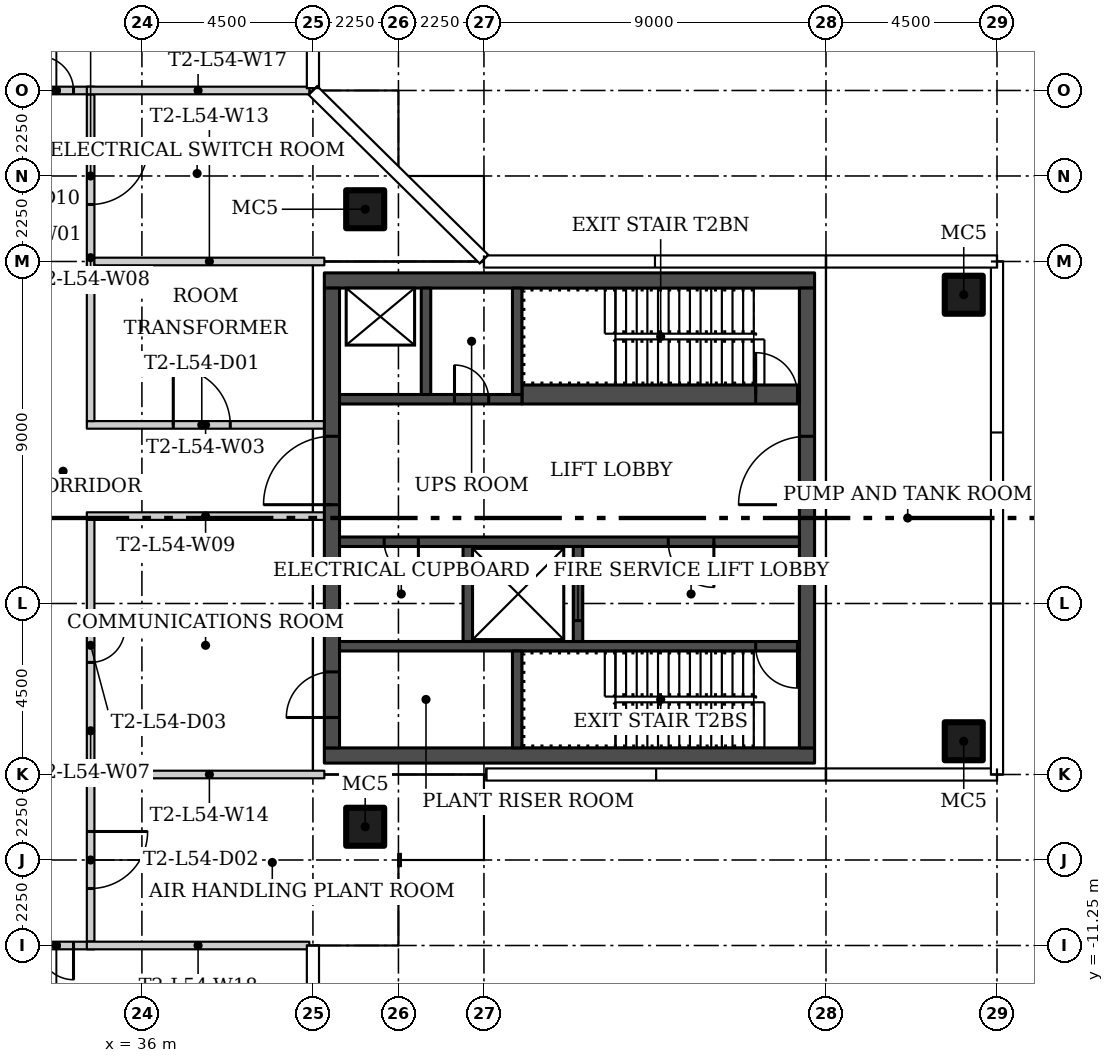
"""IFC4 building model, lengths in metres.
Left out: names, types, materials, properties, quantities, classifications, styles, units other than length and angle.
Written with IfcOpenShell. Run it as: python <this file> out.ifc"""

import sys

from ifc_helpers import new_model, si_unit, direction, frame, frame_2d, origin, origin_2d, place, context, subcontext, project, spatial, rectangle, hollow_rectangle, extrude, element, fill, save


model = new_model("IFC4")
c1 = context("Model", 3, precision=1e-05, world=origin(), true_north=direction((0.0, 1.0)))
c2 = subcontext(c1, "Body", "Model", "MODEL_VIEW")
j1 = project(units=[si_unit("LENGTHUNIT", "METRE"), si_unit("PLANEANGLEUNIT", "RADIAN")], contexts=[c1])
p1 = place(None, origin())
s1 = spatial("IfcSite", under=j1, at=p1, CompositionType="ELEMENT")
p2 = place(p1, origin())
s2 = spatial("IfcBuilding", under=s1, at=p2, CompositionType="ELEMENT")
p3 = place(p2, frame((0.0, 0.0, 225.6)))
s3 = spatial("IfcBuildingStorey", under=s2, at=p3, CompositionType="ELEMENT", Elevation=225.6)
for number, where in (
    (1, (41.875, 8.125, 0.0)),
    (2, (41.875, -8.125, 0.0)),
    (3, (57.625, -5.875, 0.0)),
    (4, (57.625, 5.875, 0.0)),
):
    element("IfcColumn", number, at=place(p3, frame(where)), inside=s3, PredefinedType="COLUMN", context=c2, shape_type="SweptSolid", body=[
        extrude(hollow_rectangle(XDim=1.0, YDim=1.0, WallThickness=0.04, at=origin_2d()), origin(), (0.0, 0.0, 1.0), 4.45),
    ])
p4 = place(p3, frame((34.55, 2.45, 0.0)))
e5 = element("IfcWall", 5, at=p4, inside=s3, PredefinedType="PARTITIONING", context=c2, shape_type="SweptSolid", body=[
    extrude(rectangle(XDim=6.25, YDim=0.2, at=frame_2d((3.125, 0.0))), origin(), (0.0, 0.0, 1.0), 4.45),
])
p5 = place(p4, frame((2.275, 0.0, 0.0)))
e6 = element("IfcOpeningElement", 6, at=p5, cuts=e5, PredefinedType="OPENING", context=c2, shape_type="SweptSolid", body=[
    extrude(rectangle(XDim=1.5, YDim=2.4, at=frame_2d((0.75, 1.2))), frame((0.0, 0.11, 0.0), z_axis=(0.0, -1.0, 0.0), x_axis=(1.0, 0.0, 0.0)), (0.0, 0.0, 1.0), 0.22),
])
p6 = place(p3, frame((34.65, -0.05, 0.0), z_axis=(0.0, 0.0, 1.0), x_axis=(0.0, -1.0, 0.0)))
e7 = element("IfcWall", 7, at=p6, inside=s3, PredefinedType="PARTITIONING", context=c2, shape_type="SweptSolid", body=[
    extrude(rectangle(XDim=11.1, YDim=0.2, at=frame_2d((5.55, 0.0))), origin(), (0.0, 0.0, 1.0), 4.45),
])
p7 = place(p6, frame((8.2, 0.0, 0.0)))
e8 = element("IfcOpeningElement", 8, at=p7, cuts=e7, PredefinedType="OPENING", context=c2, shape_type="SweptSolid", body=[
    extrude(rectangle(XDim=1.5, YDim=2.4, at=frame_2d((0.75, 1.2))), frame((0.0, 0.11, 0.0), z_axis=(0.0, -1.0, 0.0), x_axis=(1.0, 0.0, 0.0)), (0.0, 0.0, 1.0), 0.22),
])
p8 = place(p6, frame((2.85, 0.0, 0.0)))
e9 = element("IfcOpeningElement", 9, at=p8, cuts=e7, PredefinedType="OPENING", context=c2, shape_type="SweptSolid", body=[
    extrude(rectangle(XDim=0.9, YDim=2.1, at=frame_2d((0.45, 1.05))), frame((0.0, 0.11, 0.0), z_axis=(0.0, -1.0, 0.0), x_axis=(1.0, 0.0, 0.0)), (0.0, 0.0, 1.0), 0.22),
])
p9 = place(p3, frame((34.65, 11.15, 0.0), z_axis=(0.0, 0.0, 1.0), x_axis=(0.0, -1.0, 0.0)))
e10 = element("IfcWall", 10, at=p9, inside=s3, PredefinedType="PARTITIONING", context=c2, shape_type="SweptSolid", body=[
    extrude(rectangle(XDim=8.6, YDim=0.2, at=frame_2d((4.3, 0.0))), origin(), (0.0, 0.0, 1.0), 4.45),
])
p10 = place(p9, frame((1.4, 0.0, 0.0)))
e11 = element("IfcOpeningElement", 11, at=p10, cuts=e10, PredefinedType="OPENING", context=c2, shape_type="SweptSolid", body=[
    extrude(rectangle(XDim=1.5, YDim=2.4, at=frame_2d((0.75, 1.2))), frame((0.0, 0.11, 0.0), z_axis=(0.0, -1.0, 0.0), x_axis=(1.0, 0.0, 0.0)), (0.0, 0.0, 1.0), 0.22),
])
p11 = place(p3, frame((40.8, 0.05, 0.0), z_axis=(0.0, 0.0, 1.0), x_axis=(-1.0, 0.0, 0.0)))
e12 = element("IfcWall", 12, at=p11, inside=s3, PredefinedType="PARTITIONING", context=c2, shape_type="SweptSolid", body=[
    extrude(rectangle(XDim=6.25, YDim=0.2, at=frame_2d((3.125, 0.0))), origin(), (0.0, 0.0, 1.0), 4.45),
])
p12 = place(p3, frame((32.75, 11.25, 0.0)))
e13 = element("IfcWall", 13, at=p12, inside=s3, PredefinedType="PARTITIONING", context=c2, shape_type="SweptSolid", body=[
    extrude(rectangle(XDim=2.001, YDim=0.2, at=frame_2d((1.0, 0.0))), origin(), (0.0, 0.0, 1.0), 4.45),
])
p13 = place(p12, frame((0.55, 0.0, 0.0)))
e14 = element("IfcOpeningElement", 14, at=p13, cuts=e13, PredefinedType="OPENING", context=c2, shape_type="SweptSolid", body=[
    extrude(rectangle(XDim=0.9, YDim=2.4, at=frame_2d((0.45, 1.2))), frame((0.0, 0.11, 0.0), z_axis=(0.0, -1.0, 0.0), x_axis=(1.0, 0.0, 0.0)), (0.0, 0.0, 1.0), 0.22),
])
p14 = place(p3, frame((34.75, -11.25, 0.0), z_axis=(0.0, 0.0, 1.0), x_axis=(-1.0, 0.0, 0.0)))
e15 = element("IfcWall", 15, at=p14, inside=s3, PredefinedType="PARTITIONING", context=c2, shape_type="SweptSolid", body=[
    extrude(rectangle(XDim=2.001, YDim=0.2, at=frame_2d((1.0, 0.0))), origin(), (0.0, 0.0, 1.0), 4.45),
])
p15 = place(p14, frame((0.55, 0.0, 0.0)))
e16 = element("IfcOpeningElement", 16, at=p15, cuts=e15, PredefinedType="OPENING", context=c2, shape_type="SweptSolid", body=[
    extrude(rectangle(XDim=0.9, YDim=2.4, at=frame_2d((0.45, 1.2))), frame((0.0, 0.11, 0.0), z_axis=(0.0, -1.0, 0.0), x_axis=(1.0, 0.0, 0.0)), (0.0, 0.0, 1.0), 0.22),
])
p16 = place(p3, frame((40.8, 6.75, 0.0), z_axis=(0.0, 0.0, 1.0), x_axis=(-1.0, 0.0, 0.0)))
e17 = element("IfcWall", 17, at=p16, inside=s3, PredefinedType="PARTITIONING", context=c2, shape_type="SweptSolid", body=[
    extrude(rectangle(XDim=6.05, YDim=0.2, at=frame_2d((3.025, 0.0))), origin(), (0.0, 0.0, 1.0), 4.45),
])
p17 = place(p3, frame((34.75, -6.75, 0.0)))
e18 = element("IfcWall", 18, at=p17, inside=s3, PredefinedType="PARTITIONING", context=c2, shape_type="SweptSolid", body=[
    extrude(rectangle(XDim=6.05, YDim=0.2, at=frame_2d((3.025, 0.0))), origin(), (0.0, 0.0, 1.0), 4.45),
])
p18 = place(p3, frame((40.405, 11.25, 0.0), z_axis=(0.0, 0.0, 1.0), x_axis=(-1.0, 0.0, 0.0)))
e19 = element("IfcWall", 19, at=p18, inside=s3, PredefinedType="PARTITIONING", context=c2, shape_type="SweptSolid", body=[
    extrude(rectangle(XDim=5.855, YDim=0.2, at=frame_2d((2.927, 0.0))), origin(), (0.0, 0.0, 1.0), 4.45),
])
p19 = place(p3, frame((34.55, -11.25, 0.0)))
e20 = element("IfcWall", 20, at=p19, inside=s3, PredefinedType="PARTITIONING", context=c2, shape_type="SweptSolid", body=[
    extrude(rectangle(XDim=5.855, YDim=0.2, at=frame_2d((2.927, 0.0))), origin(), (0.0, 0.0, 1.0), 4.45),
])
for number, where, z_axis, x_axis in (
    (21, (53.7, -6.25, 0.0), (0.0, 0.0, 1.0), (-1.0, 0.0, 0.0)),
    (22, (53.7, 6.25, 0.0), (0.0, 0.0, 1.0), (-1.0, 0.0, 0.0)),
):
    element("IfcWall", number, at=place(p3, frame(where, z_axis=z_axis, x_axis=x_axis)), inside=s3, PredefinedType="SHEAR", context=c2, shape_type="SweptSolid", body=[
        extrude(rectangle(XDim=12.9, YDim=0.4, at=frame_2d((6.45, 0.0))), origin(), (0.0, 0.0, 1.0), 4.45),
    ])
p20 = place(p3, frame((53.5, -6.05, 0.0), z_axis=(0.0, 0.0, 1.0), x_axis=(0.0, 1.0, 0.0)))
e23 = element("IfcWall", 23, at=p20, inside=s3, PredefinedType="SHEAR", context=c2, shape_type="SweptSolid", body=[
    extrude(rectangle(XDim=12.1, YDim=0.4, at=frame_2d((6.05, 0.0))), origin(), (0.0, 0.0, 1.0), 4.45),
])
p21 = place(p20, frame((6.4, 0.0, 0.0)))
e24 = element("IfcOpeningElement", 24, at=p21, cuts=e23, PredefinedType="OPENING", context=c2, shape_type="SweptSolid", body=[
    extrude(rectangle(XDim=1.8, YDim=2.4, at=frame_2d((0.9, 1.2))), frame((0.0, 0.21, 0.0), z_axis=(0.0, -1.0, 0.0), x_axis=(1.0, 0.0, 0.0)), (0.0, 0.0, 1.0), 0.42),
])
p22 = place(p3, frame((41.0, -6.05, 0.0), z_axis=(0.0, 0.0, 1.0), x_axis=(0.0, 1.0, 0.0)))
e25 = element("IfcWall", 25, at=p22, inside=s3, PredefinedType="SHEAR", context=c2, shape_type="SweptSolid", body=[
    extrude(rectangle(XDim=12.1, YDim=0.4, at=frame_2d((6.05, 0.0))), origin(), (0.0, 0.0, 1.0), 4.45),
])
p23 = place(p22, frame((0.8, 0.0, 0.0)))
e26 = element("IfcOpeningElement", 26, at=p23, cuts=e25, PredefinedType="OPENING", context=c2, shape_type="SweptSolid", body=[
    extrude(rectangle(XDim=1.2, YDim=2.1, at=frame_2d((0.6, 1.05))), frame((0.0, 0.21, 0.0), z_axis=(0.0, -1.0, 0.0), x_axis=(1.0, 0.0, 0.0)), (0.0, 0.0, 1.0), 0.42),
])
p24 = place(p22, frame((6.4, 0.0, 0.0)))
e27 = element("IfcOpeningElement", 27, at=p24, cuts=e25, PredefinedType="OPENING", context=c2, shape_type="SweptSolid", body=[
    extrude(rectangle(XDim=1.8, YDim=2.4, at=frame_2d((0.9, 1.2))), frame((0.0, 0.21, 0.0), z_axis=(0.0, -1.0, 0.0), x_axis=(1.0, 0.0, 0.0)), (0.0, 0.0, 1.0), 0.42),
])
p25 = place(p3, frame((53.3, -3.375, 0.0), z_axis=(0.0, 0.0, 1.0), x_axis=(-1.0, 0.0, 0.0)))
e28 = element("IfcWall", 28, at=p25, inside=s3, PredefinedType="SHEAR", context=c2, shape_type="SweptSolid", body=[
    extrude(rectangle(XDim=12.1, YDim=0.25, at=frame_2d((6.05, 0.0))), origin(), (0.0, 0.0, 1.0), 4.45),
])
p26 = place(p25, frame((0.05, 0.0, 0.0)))
e29 = element("IfcOpeningElement", 29, at=p26, cuts=e28, PredefinedType="OPENING", context=c2, shape_type="SweptSolid", body=[
    extrude(rectangle(XDim=1.1, YDim=2.1, at=frame_2d((0.55, 1.05))), frame((0.0, 0.135, 0.0), z_axis=(0.0, -1.0, 0.0), x_axis=(1.0, 0.0, 0.0)), (0.0, 0.0, 1.0), 0.27),
])
p27 = place(p3, frame((45.875, -6.05, 0.0), z_axis=(0.0, 0.0, 1.0), x_axis=(0.0, 1.0, 0.0)))
e30 = element("IfcWall", 30, at=p27, inside=s3, PredefinedType="SHEAR", context=c2, shape_type="SweptSolid", body=[
    extrude(rectangle(XDim=2.55, YDim=0.25, at=frame_2d((1.275, 0.0))), origin(), (0.0, 0.0, 1.0), 4.45),
])
p28 = place(p3, frame((53.3, -0.625, 0.0), z_axis=(0.0, 0.0, 1.0), x_axis=(-1.0, 0.0, 0.0)))
e31 = element("IfcWall", 31, at=p28, inside=s3, PredefinedType="SHEAR", context=c2, shape_type="SweptSolid", body=[
    extrude(rectangle(XDim=12.1, YDim=0.25, at=frame_2d((6.05, 0.0))), origin(), (0.0, 0.0, 1.0), 4.45),
])
p29 = place(p28, frame((2.25, 0.0, 0.0)))
e32 = element("IfcOpeningElement", 32, at=p29, cuts=e31, PredefinedType="OPENING", context=c2, shape_type="SweptSolid", body=[
    extrude(rectangle(XDim=1.2, YDim=2.1, at=frame_2d((0.6, 1.05))), frame((0.0, 0.135, 0.0), z_axis=(0.0, -1.0, 0.0), x_axis=(1.0, 0.0, 0.0)), (0.0, 0.0, 1.0), 0.27),
])
p30 = place(p28, frame((10.025, 0.0, 0.0)))
e33 = element("IfcOpeningElement", 33, at=p30, cuts=e31, PredefinedType="OPENING", context=c2, shape_type="SweptSolid", body=[
    extrude(rectangle(XDim=0.9, YDim=2.1, at=frame_2d((0.45, 1.05))), frame((0.0, 0.135, 0.0), z_axis=(0.0, -1.0, 0.0), x_axis=(1.0, 0.0, 0.0)), (0.0, 0.0, 1.0), 0.27),
])
p31 = place(p3, frame((47.475, -3.25, 0.0), z_axis=(0.0, 0.0, 1.0), x_axis=(0.0, 1.0, 0.0)))
e34 = element("IfcWall", 34, at=p31, inside=s3, PredefinedType="SHEAR", context=c2, shape_type="SweptSolid", body=[
    extrude(rectangle(XDim=2.5, YDim=0.25, at=frame_2d((1.25, 0.0))), origin(), (0.0, 0.0, 1.0), 4.45),
])
p32 = place(p31, frame((0.55, 0.0, 0.0)))
e35 = element("IfcOpeningElement", 35, at=p32, cuts=e34, PredefinedType="OPENING", context=c2, shape_type="SweptSolid", body=[
    extrude(rectangle(XDim=1.4, YDim=2.4, at=frame_2d((0.7, 1.2))), frame((0.0, 0.135, 0.0), z_axis=(0.0, -1.0, 0.0), x_axis=(1.0, 0.0, 0.0)), (0.0, 0.0, 1.0), 0.27),
])
p33 = place(p3, frame((44.575, -3.25, 0.0), z_axis=(0.0, 0.0, 1.0), x_axis=(0.0, 1.0, 0.0)))
e36 = element("IfcWall", 36, at=p33, inside=s3, PredefinedType="SHEAR", context=c2, shape_type="SweptSolid", body=[
    extrude(rectangle(XDim=2.5, YDim=0.25, at=frame_2d((1.25, 0.0))), origin(), (0.0, 0.0, 1.0), 4.45),
])
p34 = place(p3, frame((46.0, 3.25, 0.0)))
e37 = element("IfcWall", 37, at=p34, inside=s3, PredefinedType="SHEAR", context=c2, shape_type="SweptSolid", body=[
    extrude(rectangle(XDim=7.3, YDim=0.5, at=frame_2d((3.65, 0.0))), origin(), (0.0, 0.0, 1.0), 4.45),
])
p35 = place(p34, frame((6.15, 0.0, 0.0)))
e38 = element("IfcOpeningElement", 38, at=p35, cuts=e37, PredefinedType="OPENING", context=c2, shape_type="SweptSolid", body=[
    extrude(rectangle(XDim=1.1, YDim=2.1, at=frame_2d((0.55, 1.05))), frame((0.0, 0.26, 0.0), z_axis=(0.0, -1.0, 0.0), x_axis=(1.0, 0.0, 0.0)), (0.0, 0.0, 1.0), 0.52),
])
p36 = place(p3, frame((41.2, 3.125, 0.0)))
e39 = element("IfcWall", 39, at=p36, inside=s3, PredefinedType="SHEAR", context=c2, shape_type="SweptSolid", body=[
    extrude(rectangle(XDim=4.8, YDim=0.25, at=frame_2d((2.4, 0.0))), origin(), (0.0, 0.0, 1.0), 4.45),
])
p37 = place(p36, frame((3.025, 0.0, 0.0)))
e40 = element("IfcOpeningElement", 40, at=p37, cuts=e39, PredefinedType="OPENING", context=c2, shape_type="SweptSolid", body=[
    extrude(rectangle(XDim=0.9, YDim=2.1, at=frame_2d((0.45, 1.05))), frame((0.0, 0.135, 0.0), z_axis=(0.0, -1.0, 0.0), x_axis=(1.0, 0.0, 0.0)), (0.0, 0.0, 1.0), 0.27),
])
for number, where, z_axis, x_axis in (
    (41, (45.875, 3.25, 0.0), (0.0, 0.0, 1.0), (0.0, 1.0, 0.0)),
    (42, (43.475, 3.25, 0.0), (0.0, 0.0, 1.0), (0.0, 1.0, 0.0)),
):
    element("IfcWall", number, at=place(p3, frame(where, z_axis=z_axis, x_axis=x_axis)), inside=s3, PredefinedType="SHEAR", context=c2, shape_type="SweptSolid", body=[
        extrude(rectangle(XDim=2.8, YDim=0.25, at=frame_2d((1.4, 0.0))), origin(), (0.0, 0.0, 1.0), 4.45),
    ])
p38 = place(p5, origin())
e43 = element("IfcDoor", 43, at=p38, inside=s3, OperationType="DOUBLE_DOOR_SINGLE_SWING", PredefinedType="DOOR", context=c2, shape_type="SweptSolid", body=[
    extrude(rectangle(XDim=1.5, YDim=2.4, at=frame_2d((0.75, 1.2))), frame((0.0, 0.025, 0.0), z_axis=(0.0, -1.0, 0.0), x_axis=(1.0, 0.0, 0.0)), (0.0, 0.0, 1.0), 0.05),
])
fill(e6, e43)
p39 = place(p7, origin())
e44 = element("IfcDoor", 44, at=p39, inside=s3, OperationType="DOUBLE_DOOR_SINGLE_SWING", PredefinedType="DOOR", context=c2, shape_type="SweptSolid", body=[
    extrude(rectangle(XDim=1.5, YDim=2.4, at=frame_2d((0.75, 1.2))), frame((0.0, 0.025, 0.0), z_axis=(0.0, -1.0, 0.0), x_axis=(1.0, 0.0, 0.0)), (0.0, 0.0, 1.0), 0.05),
])
fill(e8, e44)
p40 = place(p8, origin())
e45 = element("IfcDoor", 45, at=p40, inside=s3, OperationType="SINGLE_SWING_LEFT", PredefinedType="DOOR", context=c2, shape_type="SweptSolid", body=[
    extrude(rectangle(XDim=0.9, YDim=2.1, at=frame_2d((0.45, 1.05))), frame((0.0, 0.025, 0.0), z_axis=(0.0, -1.0, 0.0), x_axis=(1.0, 0.0, 0.0)), (0.0, 0.0, 1.0), 0.05),
])
fill(e9, e45)
p41 = place(p10, origin())
e46 = element("IfcDoor", 46, at=p41, inside=s3, OperationType="DOUBLE_DOOR_SINGLE_SWING", PredefinedType="DOOR", context=c2, shape_type="SweptSolid", body=[
    extrude(rectangle(XDim=1.5, YDim=2.4, at=frame_2d((0.75, 1.2))), frame((0.0, 0.025, 0.0), z_axis=(0.0, -1.0, 0.0), x_axis=(1.0, 0.0, 0.0)), (0.0, 0.0, 1.0), 0.05),
])
fill(e11, e46)
p42 = place(p13, origin())
e47 = element("IfcDoor", 47, at=p42, inside=s3, OperationType="SINGLE_SWING_LEFT", PredefinedType="DOOR", context=c2, shape_type="SweptSolid", body=[
    extrude(rectangle(XDim=0.9, YDim=2.4, at=frame_2d((0.45, 1.2))), frame((0.0, 0.025, 0.0), z_axis=(0.0, -1.0, 0.0), x_axis=(1.0, 0.0, 0.0)), (0.0, 0.0, 1.0), 0.05),
])
fill(e14, e47)
p43 = place(p15, origin())
e48 = element("IfcDoor", 48, at=p43, inside=s3, OperationType="SINGLE_SWING_LEFT", PredefinedType="DOOR", context=c2, shape_type="SweptSolid", body=[
    extrude(rectangle(XDim=0.9, YDim=2.4, at=frame_2d((0.45, 1.2))), frame((0.0, 0.025, 0.0), z_axis=(0.0, -1.0, 0.0), x_axis=(1.0, 0.0, 0.0)), (0.0, 0.0, 1.0), 0.05),
])
fill(e16, e48)
p44 = place(p21, origin())
e49 = element("IfcDoor", 49, at=p44, inside=s3, OperationType="DOUBLE_DOOR_SINGLE_SWING", PredefinedType="DOOR", context=c2, shape_type="SweptSolid", body=[
    extrude(rectangle(XDim=1.8, YDim=2.4, at=frame_2d((0.9, 1.2))), frame((0.0, 0.025, 0.0), z_axis=(0.0, -1.0, 0.0), x_axis=(1.0, 0.0, 0.0)), (0.0, 0.0, 1.0), 0.05),
])
fill(e24, e49)
p45 = place(p23, origin())
e50 = element("IfcDoor", 50, at=p45, inside=s3, OperationType="SINGLE_SWING_LEFT", PredefinedType="DOOR", context=c2, shape_type="SweptSolid", body=[
    extrude(rectangle(XDim=1.2, YDim=2.1, at=frame_2d((0.6, 1.05))), frame((0.0, 0.025, 0.0), z_axis=(0.0, -1.0, 0.0), x_axis=(1.0, 0.0, 0.0)), (0.0, 0.0, 1.0), 0.05),
])
fill(e26, e50)
p46 = place(p24, origin())
e51 = element("IfcDoor", 51, at=p46, inside=s3, OperationType="DOUBLE_DOOR_SINGLE_SWING", PredefinedType="DOOR", context=c2, shape_type="SweptSolid", body=[
    extrude(rectangle(XDim=1.8, YDim=2.4, at=frame_2d((0.9, 1.2))), frame((0.0, 0.025, 0.0), z_axis=(0.0, -1.0, 0.0), x_axis=(1.0, 0.0, 0.0)), (0.0, 0.0, 1.0), 0.05),
])
fill(e27, e51)
p47 = place(p26, origin())
e52 = element("IfcDoor", 52, at=p47, inside=s3, OperationType="SINGLE_SWING_LEFT", PredefinedType="DOOR", context=c2, shape_type="SweptSolid", body=[
    extrude(rectangle(XDim=1.1, YDim=2.1, at=frame_2d((0.55, 1.05))), frame((0.0, 0.025, 0.0), z_axis=(0.0, -1.0, 0.0), x_axis=(1.0, 0.0, 0.0)), (0.0, 0.0, 1.0), 0.05),
])
fill(e29, e52)
p48 = place(p29, origin())
e53 = element("IfcDoor", 53, at=p48, inside=s3, OperationType="SINGLE_SWING_LEFT", PredefinedType="DOOR", context=c2, shape_type="SweptSolid", body=[
    extrude(rectangle(XDim=1.2, YDim=2.1, at=frame_2d((0.6, 1.05))), frame((0.0, 0.025, 0.0), z_axis=(0.0, -1.0, 0.0), x_axis=(1.0, 0.0, 0.0)), (0.0, 0.0, 1.0), 0.05),
])
fill(e32, e53)
p49 = place(p30, origin())
e54 = element("IfcDoor", 54, at=p49, inside=s3, OperationType="SINGLE_SWING_RIGHT", PredefinedType="DOOR", context=c2, shape_type="SweptSolid", body=[
    extrude(rectangle(XDim=0.9, YDim=2.1, at=frame_2d((0.45, 1.05))), frame((0.0, 0.025, 0.0), z_axis=(0.0, -1.0, 0.0), x_axis=(1.0, 0.0, 0.0)), (0.0, 0.0, 1.0), 0.05),
])
fill(e33, e54)
p50 = place(p32, origin())
e55 = element("IfcDoor", 55, at=p50, inside=s3, OperationType="SLIDING_TO_LEFT", PredefinedType="DOOR", context=c2, shape_type="SweptSolid", body=[
    extrude(rectangle(XDim=1.4, YDim=2.4, at=frame_2d((0.7, 1.2))), frame((0.0, 0.025, 0.0), z_axis=(0.0, -1.0, 0.0), x_axis=(1.0, 0.0, 0.0)), (0.0, 0.0, 1.0), 0.05),
])
fill(e35, e55)
p51 = place(p35, origin())
e56 = element("IfcDoor", 56, at=p51, inside=s3, OperationType="SINGLE_SWING_RIGHT", PredefinedType="DOOR", context=c2, shape_type="SweptSolid", body=[
    extrude(rectangle(XDim=1.1, YDim=2.1, at=frame_2d((0.55, 1.05))), frame((0.0, 0.025, 0.0), z_axis=(0.0, -1.0, 0.0), x_axis=(1.0, 0.0, 0.0)), (0.0, 0.0, 1.0), 0.05),
])
fill(e38, e56)
p52 = place(p37, origin())
e57 = element("IfcDoor", 57, at=p52, inside=s3, OperationType="SINGLE_SWING_RIGHT", PredefinedType="DOOR", context=c2, shape_type="SweptSolid", body=[
    extrude(rectangle(XDim=0.9, YDim=2.1, at=frame_2d((0.45, 1.05))), frame((0.0, 0.025, 0.0), z_axis=(0.0, -1.0, 0.0), x_axis=(1.0, 0.0, 0.0)), (0.0, 0.0, 1.0), 0.05),
])
fill(e40, e57)
save(model, sys.argv[1])
